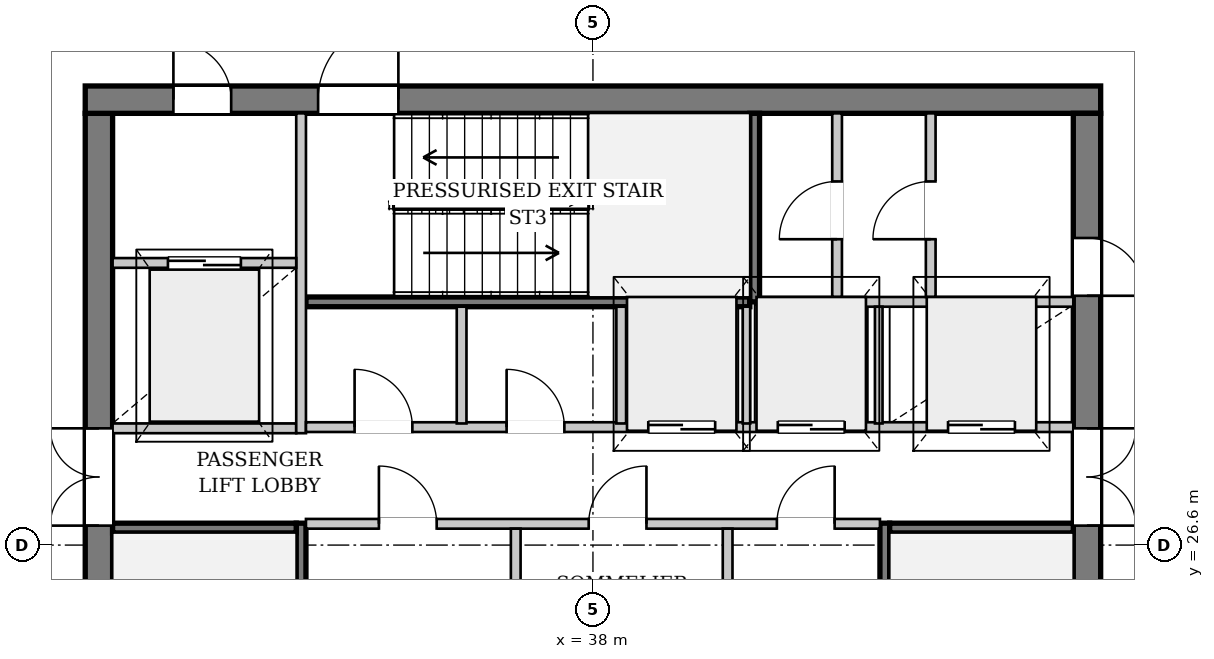
"""IFC4 building model, lengths in metres.
Left out: names, types, materials, properties, quantities, classifications, styles, units other than length and angle.
Written with IfcOpenShell. Run it as: python <this file> out.ifc"""

import sys

from ifc_helpers import new_model, si_unit, direction, frame, frame_2d, origin, place, context, subcontext, project, spatial, rectangle, extrude, source, transform, mapped, element, fill, save


model = new_model("IFC4")
c1 = context("Model", 3, precision=1e-05, world=origin(), true_north=direction((0.0, 1.0)))
c2 = subcontext(c1, "Body", "Model", "MODEL_VIEW")
j1 = project(units=[si_unit("LENGTHUNIT", "METRE"), si_unit("PLANEANGLEUNIT", "RADIAN")], contexts=[c1])
p1 = place(None, origin())
s1 = spatial("IfcSite", under=j1, at=p1, CompositionType="ELEMENT")
p2 = place(p1, origin())
s2 = spatial("IfcBuilding", under=s1, at=p2, CompositionType="ELEMENT")
p3 = place(p2, frame((0.0, 0.0, 281.9)))
s3 = spatial("IfcBuildingStorey", under=s2, at=p3, CompositionType="ELEMENT", Elevation=281.9)
p4 = place(p3, frame((29.875, 19.5, 0.0), z_axis=(0.0, 0.0, 1.0), x_axis=(0.0, 1.0, 0.0)))
e1 = element("IfcWall", 1, at=p4, inside=s3, PredefinedType="SHEAR", context=c2, shape_type="SweptSolid", body=[
    extrude(rectangle(XDim=14.2, YDim=0.45, at=frame_2d((7.1, 0.0))), origin(), (0.0, 0.0, 1.0), 3.92),
])
p5 = place(p4, frame((7.42, 0.0, 0.0)))
e2 = element("IfcOpeningElement", 2, at=p5, cuts=e1, PredefinedType="OPENING", context=c2, shape_type="SweptSolid", body=[
    extrude(rectangle(XDim=1.6, YDim=2.2, at=frame_2d((0.8, 1.1))), frame((0.0, 0.235, 0.0), z_axis=(0.0, -1.0, 0.0), x_axis=(1.0, 0.0, 0.0)), (0.0, 0.0, 1.0), 0.47),
])
p6 = place(p3, frame((29.65, 33.925, 0.0), z_axis=(0.0, 0.0, 1.0), x_axis=(1.0, 0.0, 0.0)))
e3 = element("IfcWall", 3, at=p6, inside=s3, PredefinedType="SHEAR", context=c2, shape_type="SweptSolid", body=[
    extrude(rectangle(XDim=16.7, YDim=0.45, at=frame_2d((8.35, 0.0))), origin(), (0.0, 0.0, 1.0), 3.92),
])
p7 = place(p6, frame((1.45, 0.0, 0.0)))
e4 = element("IfcOpeningElement", 4, at=p7, cuts=e3, PredefinedType="OPENING", context=c2, shape_type="SweptSolid", body=[
    extrude(rectangle(XDim=0.95, YDim=2.1, at=frame_2d((0.475, 1.05))), frame((0.0, 0.235, 0.0), z_axis=(0.0, -1.0, 0.0), x_axis=(1.0, 0.0, 0.0)), (0.0, 0.0, 1.0), 0.47),
])
p8 = place(p6, frame((3.83, 0.0, 0.0)))
e5 = element("IfcOpeningElement", 5, at=p8, cuts=e3, PredefinedType="OPENING", context=c2, shape_type="SweptSolid", body=[
    extrude(rectangle(XDim=1.32, YDim=2.2, at=frame_2d((0.66, 1.1))), frame((0.0, 0.235, 0.0), z_axis=(0.0, -1.0, 0.0), x_axis=(1.0, 0.0, 0.0)), (0.0, 0.0, 1.0), 0.47),
])
p9 = place(p3, frame((46.125, 33.7, 0.0), z_axis=(0.0, 0.0, 1.0), x_axis=(0.0, -1.0, 0.0)))
e6 = element("IfcWall", 6, at=p9, inside=s3, PredefinedType="SHEAR", context=c2, shape_type="SweptSolid", body=[
    extrude(rectangle(XDim=14.2, YDim=0.45, at=frame_2d((7.1, 0.0))), origin(), (0.0, 0.0, 1.0), 3.92),
])
p10 = place(p9, frame((5.18, 0.0, 0.0)))
e7 = element("IfcOpeningElement", 7, at=p10, cuts=e6, PredefinedType="OPENING", context=c2, shape_type="SweptSolid", body=[
    extrude(rectangle(XDim=1.6, YDim=2.2, at=frame_2d((0.8, 1.1))), frame((0.0, 0.235, 0.0), z_axis=(0.0, -1.0, 0.0), x_axis=(1.0, 0.0, 0.0)), (0.0, 0.0, 1.0), 0.47),
])
p11 = place(p9, frame((2.05, 0.0, 0.0)))
e8 = element("IfcOpeningElement", 8, at=p11, cuts=e6, PredefinedType="OPENING", context=c2, shape_type="SweptSolid", body=[
    extrude(rectangle(XDim=0.95, YDim=2.1, at=frame_2d((0.475, 1.05))), frame((0.0, 0.235, 0.0), z_axis=(0.0, -1.0, 0.0), x_axis=(1.0, 0.0, 0.0)), (0.0, 0.0, 1.0), 0.47),
])
p12 = place(p3, frame((33.2, 19.5, 0.0), z_axis=(0.0, 0.0, 1.0), x_axis=(0.0, 1.0, 0.0)))
e9 = element("IfcWall", 9, at=p12, inside=s3, PredefinedType="PARTITIONING", context=c2, shape_type="SweptSolid", body=[
    extrude(rectangle(XDim=7.46, YDim=0.16, at=frame_2d((3.73, 0.0))), origin(), (0.0, 0.0, 1.0), 3.92),
])
p13 = place(p12, frame((0.08, 0.0, 0.0)))
e10 = element("IfcOpeningElement", 10, at=p13, cuts=e9, PredefinedType="OPENING", context=c2, shape_type="SweptSolid", body=[
    extrude(rectangle(XDim=1.32, YDim=2.2, at=frame_2d((0.66, 1.1))), frame((0.0, 0.09, 0.0), z_axis=(0.0, -1.0, 0.0), x_axis=(1.0, 0.0, 0.0)), (0.0, 0.0, 1.0), 0.18),
])
p14 = place(p3, frame((30.1, 26.88, 0.0), z_axis=(0.0, 0.0, 1.0), x_axis=(1.0, 0.0, 0.0)))
e11 = element("IfcWall", 11, at=p14, inside=s3, PredefinedType="PARTITIONING", context=c2, shape_type="SweptSolid", body=[
    extrude(rectangle(XDim=3.02, YDim=0.16, at=frame_2d((1.51, 0.0))), origin(), (0.0, 0.0, 1.0), 3.92),
])
p15 = place(p3, frame((42.8, 26.96, 0.0), z_axis=(0.0, 0.0, 1.0), x_axis=(0.0, -1.0, 0.0)))
e12 = element("IfcWall", 12, at=p15, inside=s3, PredefinedType="PARTITIONING", context=c2, shape_type="SweptSolid", body=[
    extrude(rectangle(XDim=7.46, YDim=0.16, at=frame_2d((3.73, 0.0))), origin(), (0.0, 0.0, 1.0), 3.92),
])
p16 = place(p15, frame((6.06, 0.0, 0.0)))
e13 = element("IfcOpeningElement", 13, at=p16, cuts=e12, PredefinedType="OPENING", context=c2, shape_type="SweptSolid", body=[
    extrude(rectangle(XDim=1.32, YDim=2.2, at=frame_2d((0.66, 1.1))), frame((0.0, 0.09, 0.0), z_axis=(0.0, -1.0, 0.0), x_axis=(1.0, 0.0, 0.0)), (0.0, 0.0, 1.0), 0.18),
])
p17 = place(p3, frame((42.88, 26.88, 0.0), z_axis=(0.0, 0.0, 1.0), x_axis=(1.0, 0.0, 0.0)))
e14 = element("IfcWall", 14, at=p17, inside=s3, PredefinedType="PARTITIONING", context=c2, shape_type="SweptSolid", body=[
    extrude(rectangle(XDim=3.02, YDim=0.16, at=frame_2d((1.51, 0.0))), origin(), (0.0, 0.0, 1.0), 3.92),
])
p18 = place(p3, frame((33.28, 30.6, 0.0), z_axis=(0.0, 0.0, 1.0), x_axis=(1.0, 0.0, 0.0)))
e15 = element("IfcWall", 15, at=p18, inside=s3, PredefinedType="PARTITIONING", context=c2, shape_type="SweptSolid", body=[
    extrude(rectangle(XDim=7.3, YDim=0.16, at=frame_2d((3.65, 0.0))), origin(), (0.0, 0.0, 1.0), 3.92),
])
p19 = place(p3, frame((40.66, 30.6, 0.0), z_axis=(0.0, 0.0, 1.0), x_axis=(0.0, 1.0, 0.0)))
e16 = element("IfcWall", 16, at=p19, inside=s3, PredefinedType="PARTITIONING", context=c2, shape_type="SweptSolid", body=[
    extrude(rectangle(XDim=3.1, YDim=0.16, at=frame_2d((1.55, 0.0))), origin(), (0.0, 0.0, 1.0), 3.92),
])
p20 = place(p3, frame((30.1, 28.52, 0.0), z_axis=(0.0, 0.0, 1.0), x_axis=(1.0, 0.0, 0.0)))
e17 = element("IfcWall", 17, at=p20, inside=s3, PredefinedType="PARTITIONING", context=c2, shape_type="SweptSolid", body=[
    extrude(rectangle(XDim=3.02, YDim=0.16, at=frame_2d((1.51, 0.0))), origin(), (0.0, 0.0, 1.0), 3.92),
])
p21 = place(p3, frame((33.2, 28.44, 0.0), z_axis=(0.0, 0.0, 1.0), x_axis=(0.0, 1.0, 0.0)))
e18 = element("IfcWall", 18, at=p21, inside=s3, PredefinedType="PARTITIONING", context=c2, shape_type="SweptSolid", body=[
    extrude(rectangle(XDim=5.26, YDim=0.16, at=frame_2d((2.63, 0.0))), origin(), (0.0, 0.0, 1.0), 3.92),
])
p22 = place(p3, frame((30.1, 31.24, 0.0), z_axis=(0.0, 0.0, 1.0), x_axis=(1.0, 0.0, 0.0)))
e19 = element("IfcWall", 19, at=p22, inside=s3, PredefinedType="PARTITIONING", context=c2, shape_type="SweptSolid", body=[
    extrude(rectangle(XDim=3.02, YDim=0.16, at=frame_2d((1.51, 0.0))), origin(), (0.0, 0.0, 1.0), 3.92),
])
p23 = place(p22, frame((0.91, 0.0, 0.0)))
e20 = element("IfcOpeningElement", 20, at=p23, cuts=e19, PredefinedType="OPENING", context=c2, shape_type="SweptSolid", body=[
    extrude(rectangle(XDim=1.2, YDim=2.2, at=frame_2d((0.6, 1.1))), frame((0.0, 0.09, 0.0), z_axis=(0.0, -1.0, 0.0), x_axis=(1.0, 0.0, 0.0)), (0.0, 0.0, 1.0), 0.18),
])
p24 = place(p3, frame((33.28, 26.95, 0.0), z_axis=(0.0, 0.0, 1.0), x_axis=(1.0, 0.0, 0.0)))
e21 = element("IfcWall", 21, at=p24, inside=s3, PredefinedType="PARTITIONING", context=c2, shape_type="SweptSolid", body=[
    extrude(rectangle(XDim=9.44, YDim=0.16, at=frame_2d((4.72, 0.0))), origin(), (0.0, 0.0, 1.0), 3.92),
])
p25 = place(p24, frame((1.2, 0.0, 0.0)))
e22 = element("IfcOpeningElement", 22, at=p25, cuts=e21, PredefinedType="OPENING", context=c2, shape_type="SweptSolid", body=[
    extrude(rectangle(XDim=0.95, YDim=2.1, at=frame_2d((0.475, 1.05))), frame((0.0, 0.09, 0.0), z_axis=(0.0, -1.0, 0.0), x_axis=(1.0, 0.0, 0.0)), (0.0, 0.0, 1.0), 0.18),
])
p26 = place(p24, frame((4.65, 0.0, 0.0)))
e23 = element("IfcOpeningElement", 23, at=p26, cuts=e21, PredefinedType="OPENING", context=c2, shape_type="SweptSolid", body=[
    extrude(rectangle(XDim=0.95, YDim=2.1, at=frame_2d((0.475, 1.05))), frame((0.0, 0.09, 0.0), z_axis=(0.0, -1.0, 0.0), x_axis=(1.0, 0.0, 0.0)), (0.0, 0.0, 1.0), 0.18),
])
p27 = place(p24, frame((7.745, 0.0, 0.0)))
e24 = element("IfcOpeningElement", 24, at=p27, cuts=e21, PredefinedType="OPENING", context=c2, shape_type="SweptSolid", body=[
    extrude(rectangle(XDim=0.95, YDim=2.1, at=frame_2d((0.475, 1.05))), frame((0.0, 0.09, 0.0), z_axis=(0.0, -1.0, 0.0), x_axis=(1.0, 0.0, 0.0)), (0.0, 0.0, 1.0), 0.18),
])
for number, where, z_axis, x_axis in (
    (25, (36.73, 24.56, 0.0), (0.0, 0.0, 1.0), (0.0, 1.0, 0.0)),
    (26, (40.215, 24.56, 0.0), (0.0, 0.0, 1.0), (0.0, 1.0, 0.0)),
):
    element("IfcWall", number, at=place(p3, frame(where, z_axis=z_axis, x_axis=x_axis)), inside=s3, PredefinedType="PARTITIONING", context=c2, shape_type="SweptSolid", body=[
        extrude(rectangle(XDim=2.31, YDim=0.16, at=frame_2d((1.155, 0.0))), origin(), (0.0, 0.0, 1.0), 3.92),
    ])
p28 = place(p3, frame((33.28, 28.54, 0.0), z_axis=(0.0, 0.0, 1.0), x_axis=(1.0, 0.0, 0.0)))
e27 = element("IfcWall", 27, at=p28, inside=s3, PredefinedType="PARTITIONING", context=c2, shape_type="SweptSolid", body=[
    extrude(rectangle(XDim=12.62, YDim=0.16, at=frame_2d((6.31, 0.0))), origin(), (0.0, 0.0, 1.0), 3.92),
])
p29 = place(p28, frame((0.8, 0.0, 0.0)))
e28 = element("IfcOpeningElement", 28, at=p29, cuts=e27, PredefinedType="OPENING", context=c2, shape_type="SweptSolid", body=[
    extrude(rectangle(XDim=0.95, YDim=2.1, at=frame_2d((0.475, 1.05))), frame((0.0, 0.09, 0.0), z_axis=(0.0, -1.0, 0.0), x_axis=(1.0, 0.0, 0.0)), (0.0, 0.0, 1.0), 0.18),
])
p30 = place(p28, frame((3.3, 0.0, 0.0)))
e29 = element("IfcOpeningElement", 29, at=p30, cuts=e27, PredefinedType="OPENING", context=c2, shape_type="SweptSolid", body=[
    extrude(rectangle(XDim=0.95, YDim=2.1, at=frame_2d((0.475, 1.05))), frame((0.0, 0.09, 0.0), z_axis=(0.0, -1.0, 0.0), x_axis=(1.0, 0.0, 0.0)), (0.0, 0.0, 1.0), 0.18),
])
p31 = place(p28, frame((5.63, 0.0, 0.0)))
e30 = element("IfcOpeningElement", 30, at=p31, cuts=e27, PredefinedType="OPENING", context=c2, shape_type="SweptSolid", body=[
    extrude(rectangle(XDim=1.1, YDim=2.2, at=frame_2d((0.55, 1.1))), frame((0.0, 0.09, 0.0), z_axis=(0.0, -1.0, 0.0), x_axis=(1.0, 0.0, 0.0)), (0.0, 0.0, 1.0), 0.18),
])
p32 = place(p28, frame((7.76, 0.0, 0.0)))
e31 = element("IfcOpeningElement", 31, at=p32, cuts=e27, PredefinedType="OPENING", context=c2, shape_type="SweptSolid", body=[
    extrude(rectangle(XDim=1.1, YDim=2.2, at=frame_2d((0.55, 1.1))), frame((0.0, 0.09, 0.0), z_axis=(0.0, -1.0, 0.0), x_axis=(1.0, 0.0, 0.0)), (0.0, 0.0, 1.0), 0.18),
])
p33 = place(p28, frame((10.56, 0.0, 0.0)))
e32 = element("IfcOpeningElement", 32, at=p33, cuts=e27, PredefinedType="OPENING", context=c2, shape_type="SweptSolid", body=[
    extrude(rectangle(XDim=1.1, YDim=2.2, at=frame_2d((0.55, 1.1))), frame((0.0, 0.09, 0.0), z_axis=(0.0, -1.0, 0.0), x_axis=(1.0, 0.0, 0.0)), (0.0, 0.0, 1.0), 0.18),
])
p34 = place(p3, frame((40.72, 30.6, 0.0), z_axis=(0.0, 0.0, 1.0), x_axis=(1.0, 0.0, 0.0)))
e33 = element("IfcWall", 33, at=p34, inside=s3, PredefinedType="PARTITIONING", context=c2, shape_type="SweptSolid", body=[
    extrude(rectangle(XDim=5.18, YDim=0.16, at=frame_2d((2.59, 0.0))), origin(), (0.0, 0.0, 1.0), 3.92),
])
for number, where, z_axis, x_axis in (
    (34, (35.84, 28.6, 0.0), (0.0, 0.0, 1.0), (0.0, 1.0, 0.0)),
    (35, (38.465, 28.6, 0.0), (0.0, 0.0, 1.0), (0.0, 1.0, 0.0)),
):
    element("IfcWall", number, at=place(p3, frame(where, z_axis=z_axis, x_axis=x_axis)), inside=s3, PredefinedType="PARTITIONING", context=c2, shape_type="SweptSolid", body=[
        extrude(rectangle(XDim=1.92, YDim=0.16, at=frame_2d((0.96, 0.0))), origin(), (0.0, 0.0, 1.0), 3.92),
    ])
for number, where, z_axis, x_axis in (
    (36, (40.525, 28.6, 0.0), (0.0, 0.0, 1.0), (0.0, 1.0, 0.0)),
    (37, (42.7, 28.6, 0.0), (0.0, 0.0, 1.0), (0.0, 1.0, 0.0)),
):
    element("IfcWall", number, at=place(p3, frame(where, z_axis=z_axis, x_axis=x_axis)), inside=s3, PredefinedType="PARTITIONING", context=c2, shape_type="SweptSolid", body=[
        extrude(rectangle(XDim=1.92, YDim=0.125, at=frame_2d((0.96, 0.0))), origin(), (0.0, 0.0, 1.0), 3.92),
    ])
p35 = place(p3, frame((42.015, 30.68, 0.0), z_axis=(0.0, 0.0, 1.0), x_axis=(0.0, 1.0, 0.0)))
e38 = element("IfcWall", 38, at=p35, inside=s3, PredefinedType="PARTITIONING", context=c2, shape_type="SweptSolid", body=[
    extrude(rectangle(XDim=3.02, YDim=0.16, at=frame_2d((1.51, 0.0))), origin(), (0.0, 0.0, 1.0), 3.92),
])
p36 = place(p35, frame((0.95, 0.0, 0.0)))
e39 = element("IfcOpeningElement", 39, at=p36, cuts=e38, PredefinedType="OPENING", context=c2, shape_type="SweptSolid", body=[
    extrude(rectangle(XDim=0.95, YDim=2.1, at=frame_2d((0.475, 1.05))), frame((0.0, 0.09, 0.0), z_axis=(0.0, -1.0, 0.0), x_axis=(1.0, 0.0, 0.0)), (0.0, 0.0, 1.0), 0.18),
])
p37 = place(p3, frame((43.555, 30.68, 0.0), z_axis=(0.0, 0.0, 1.0), x_axis=(0.0, 1.0, 0.0)))
e40 = element("IfcWall", 40, at=p37, inside=s3, PredefinedType="PARTITIONING", context=c2, shape_type="SweptSolid", body=[
    extrude(rectangle(XDim=3.02, YDim=0.16, at=frame_2d((1.51, 0.0))), origin(), (0.0, 0.0, 1.0), 3.92),
])
p38 = place(p37, frame((0.95, 0.0, 0.0)))
e41 = element("IfcOpeningElement", 41, at=p38, cuts=e40, PredefinedType="OPENING", context=c2, shape_type="SweptSolid", body=[
    extrude(rectangle(XDim=0.95, YDim=2.1, at=frame_2d((0.475, 1.05))), frame((0.0, 0.09, 0.0), z_axis=(0.0, -1.0, 0.0), x_axis=(1.0, 0.0, 0.0)), (0.0, 0.0, 1.0), 0.18),
])
m1 = source(origin(), c2, "Body", "SweptSolid", [
    extrude(rectangle(XDim=1.6, YDim=2.2, at=frame_2d((0.8, 1.1))), frame((0.0, 0.025, 0.0), z_axis=(0.0, -1.0, 0.0), x_axis=(1.0, 0.0, 0.0)), (0.0, 0.0, 1.0), 0.05),
])
p39 = place(p5, origin())
e42 = element("IfcDoor", 42, at=p39, inside=s3, OperationType="DOUBLE_DOOR_SINGLE_SWING", PredefinedType="DOOR", context=c2, shape_type="MappedRepresentation", body=[
    mapped(m1, transform((0.0, 0.0, 0.0), x_axis=(1.0, 0.0, 0.0), y_axis=(0.0, 1.0, 0.0), z_axis=(0.0, 0.0, 1.0), scale=1.0)),
])
fill(e2, e42)
m2 = source(origin(), c2, "Body", "SweptSolid", [
    extrude(rectangle(XDim=0.95, YDim=2.1, at=frame_2d((0.475, 1.05))), frame((0.0, 0.025, 0.0), z_axis=(0.0, -1.0, 0.0), x_axis=(1.0, 0.0, 0.0)), (0.0, 0.0, 1.0), 0.05),
])
p40 = place(p7, origin())
e43 = element("IfcDoor", 43, at=p40, inside=s3, OperationType="SINGLE_SWING_LEFT", PredefinedType="DOOR", context=c2, shape_type="MappedRepresentation", body=[
    mapped(m2, transform((0.0, 0.0, 0.0), x_axis=(1.0, 0.0, 0.0), y_axis=(0.0, 1.0, 0.0), z_axis=(0.0, 0.0, 1.0), scale=1.0)),
])
fill(e4, e43)
m3 = source(origin(), c2, "Body", "SweptSolid", [
    extrude(rectangle(XDim=1.32, YDim=2.2, at=frame_2d((0.66, 1.1))), frame((0.0, 0.025, 0.0), z_axis=(0.0, -1.0, 0.0), x_axis=(1.0, 0.0, 0.0)), (0.0, 0.0, 1.0), 0.05),
])
p41 = place(p8, origin())
e44 = element("IfcDoor", 44, at=p41, inside=s3, OperationType="SINGLE_SWING_RIGHT", PredefinedType="DOOR", context=c2, shape_type="MappedRepresentation", body=[
    mapped(m3, transform((0.0, 0.0, 0.0), x_axis=(1.0, 0.0, 0.0), y_axis=(0.0, 1.0, 0.0), z_axis=(0.0, 0.0, 1.0), scale=1.0)),
])
fill(e5, e44)
p42 = place(p10, origin())
e45 = element("IfcDoor", 45, at=p42, inside=s3, OperationType="DOUBLE_DOOR_SINGLE_SWING", PredefinedType="DOOR", context=c2, shape_type="MappedRepresentation", body=[
    mapped(m1, transform((0.0, 0.0, 0.0), x_axis=(1.0, 0.0, 0.0), y_axis=(0.0, 1.0, 0.0), z_axis=(0.0, 0.0, 1.0), scale=1.0)),
])
fill(e7, e45)
m4 = source(origin(), c2, "Body", "SweptSolid", [
    extrude(rectangle(XDim=1.2, YDim=2.2, at=frame_2d((0.6, 1.1))), frame((0.0, 0.025, 0.0), z_axis=(0.0, -1.0, 0.0), x_axis=(1.0, 0.0, 0.0)), (0.0, 0.0, 1.0), 0.05),
])
p43 = place(p23, origin())
e46 = element("IfcDoor", 46, at=p43, inside=s3, OperationType="DOUBLE_DOOR_SLIDING", PredefinedType="DOOR", context=c2, shape_type="MappedRepresentation", body=[
    mapped(m4, transform((0.0, 0.0, 0.0), x_axis=(1.0, 0.0, 0.0), y_axis=(0.0, 1.0, 0.0), z_axis=(0.0, 0.0, 1.0), scale=1.0)),
])
fill(e20, e46)
p44 = place(p25, origin())
e47 = element("IfcDoor", 47, at=p44, inside=s3, OperationType="SINGLE_SWING_LEFT", PredefinedType="DOOR", context=c2, shape_type="MappedRepresentation", body=[
    mapped(m2, transform((0.0, 0.0, 0.0), x_axis=(1.0, 0.0, 0.0), y_axis=(0.0, 1.0, 0.0), z_axis=(0.0, 0.0, 1.0), scale=1.0)),
])
fill(e22, e47)
p45 = place(p26, origin())
e48 = element("IfcDoor", 48, at=p45, inside=s3, OperationType="SINGLE_SWING_RIGHT", PredefinedType="DOOR", context=c2, shape_type="MappedRepresentation", body=[
    mapped(m2, transform((0.0, 0.0, 0.0), x_axis=(1.0, 0.0, 0.0), y_axis=(0.0, 1.0, 0.0), z_axis=(0.0, 0.0, 1.0), scale=1.0)),
])
fill(e23, e48)
p46 = place(p27, origin())
e49 = element("IfcDoor", 49, at=p46, inside=s3, OperationType="SINGLE_SWING_RIGHT", PredefinedType="DOOR", context=c2, shape_type="MappedRepresentation", body=[
    mapped(m2, transform((0.0, 0.0, 0.0), x_axis=(1.0, 0.0, 0.0), y_axis=(0.0, 1.0, 0.0), z_axis=(0.0, 0.0, 1.0), scale=1.0)),
])
fill(e24, e49)
p47 = place(p29, origin())
e50 = element("IfcDoor", 50, at=p47, inside=s3, OperationType="SINGLE_SWING_LEFT", PredefinedType="DOOR", context=c2, shape_type="MappedRepresentation", body=[
    mapped(m2, transform((0.0, 0.0, 0.0), x_axis=(1.0, 0.0, 0.0), y_axis=(0.0, 1.0, 0.0), z_axis=(0.0, 0.0, 1.0), scale=1.0)),
])
fill(e28, e50)
p48 = place(p30, origin())
e51 = element("IfcDoor", 51, at=p48, inside=s3, OperationType="SINGLE_SWING_LEFT", PredefinedType="DOOR", context=c2, shape_type="MappedRepresentation", body=[
    mapped(m2, transform((0.0, 0.0, 0.0), x_axis=(1.0, 0.0, 0.0), y_axis=(0.0, 1.0, 0.0), z_axis=(0.0, 0.0, 1.0), scale=1.0)),
])
fill(e29, e51)
m5 = source(origin(), c2, "Body", "SweptSolid", [
    extrude(rectangle(XDim=1.1, YDim=2.2, at=frame_2d((0.55, 1.1))), frame((0.0, 0.025, 0.0), z_axis=(0.0, -1.0, 0.0), x_axis=(1.0, 0.0, 0.0)), (0.0, 0.0, 1.0), 0.05),
])
p49 = place(p31, origin())
e52 = element("IfcDoor", 52, at=p49, inside=s3, OperationType="DOUBLE_DOOR_SLIDING", PredefinedType="DOOR", context=c2, shape_type="MappedRepresentation", body=[
    mapped(m5, transform((0.0, 0.0, 0.0), x_axis=(1.0, 0.0, 0.0), y_axis=(0.0, 1.0, 0.0), z_axis=(0.0, 0.0, 1.0), scale=1.0)),
])
fill(e30, e52)
p50 = place(p32, origin())
e53 = element("IfcDoor", 53, at=p50, inside=s3, OperationType="DOUBLE_DOOR_SLIDING", PredefinedType="DOOR", context=c2, shape_type="MappedRepresentation", body=[
    mapped(m5, transform((0.0, 0.0, 0.0), x_axis=(1.0, 0.0, 0.0), y_axis=(0.0, 1.0, 0.0), z_axis=(0.0, 0.0, 1.0), scale=1.0)),
])
fill(e31, e53)
p51 = place(p33, origin())
e54 = element("IfcDoor", 54, at=p51, inside=s3, OperationType="DOUBLE_DOOR_SLIDING", PredefinedType="DOOR", context=c2, shape_type="MappedRepresentation", body=[
    mapped(m5, transform((0.0, 0.0, 0.0), x_axis=(1.0, 0.0, 0.0), y_axis=(0.0, 1.0, 0.0), z_axis=(0.0, 0.0, 1.0), scale=1.0)),
])
fill(e32, e54)
p52 = place(p36, origin())
e55 = element("IfcDoor", 55, at=p52, inside=s3, OperationType="SINGLE_SWING_LEFT", PredefinedType="DOOR", context=c2, shape_type="MappedRepresentation", body=[
    mapped(m2, transform((0.0, 0.0, 0.0), x_axis=(1.0, 0.0, 0.0), y_axis=(0.0, 1.0, 0.0), z_axis=(0.0, 0.0, 1.0), scale=1.0)),
])
fill(e39, e55)
p53 = place(p38, origin())
e56 = element("IfcDoor", 56, at=p53, inside=s3, OperationType="SINGLE_SWING_LEFT", PredefinedType="DOOR", context=c2, shape_type="MappedRepresentation", body=[
    mapped(m2, transform((0.0, 0.0, 0.0), x_axis=(1.0, 0.0, 0.0), y_axis=(0.0, 1.0, 0.0), z_axis=(0.0, 0.0, 1.0), scale=1.0)),
])
fill(e41, e56)
p54 = place(p11, origin())
e57 = element("IfcDoor", 57, at=p54, inside=s3, OperationType="SINGLE_SWING_RIGHT", PredefinedType="DOOR", context=c2, shape_type="MappedRepresentation", body=[
    mapped(m2, transform((0.0, 0.0, 0.0), x_axis=(1.0, 0.0, 0.0), y_axis=(0.0, 1.0, 0.0), z_axis=(0.0, 0.0, 1.0), scale=1.0)),
])
fill(e8, e57)
save(model, sys.argv[1])
